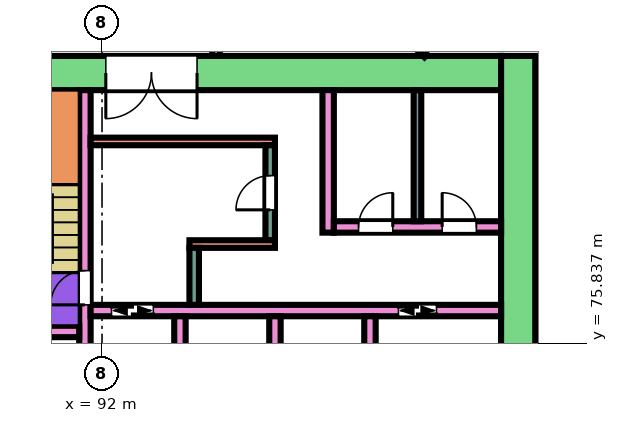
"""IFC4 building model, lengths in metres.
Left out: names, types, materials, properties, quantities, classifications, styles, units other than length and angle.
Written with IfcOpenShell. Run it as: python <this file> out.ifc"""

import sys

from ifc_helpers import new_model, si_unit, direction, frame, frame_2d, origin, place, context, subcontext, project, spatial, rectangle, extrude, element, fill, save


model = new_model("IFC4")
c1 = context("Model", 3, precision=1e-05, world=origin(), true_north=direction((0.0, 1.0)))
c2 = subcontext(c1, "Body", "Model", "MODEL_VIEW")
j1 = project(units=[si_unit("LENGTHUNIT", "METRE"), si_unit("PLANEANGLEUNIT", "RADIAN")], contexts=[c1])
p1 = place(None, origin())
s1 = spatial("IfcSite", under=j1, at=p1, CompositionType="ELEMENT")
p2 = place(p1, origin())
s2 = spatial("IfcBuilding", under=s1, at=p2, CompositionType="ELEMENT")
p3 = place(p2, frame((0.0, 0.0, 12.4)))
s3 = spatial("IfcBuildingStorey", under=s2, at=p3, CompositionType="ELEMENT", Elevation=12.4)
p4 = place(p3, frame((87.9, 82.95, 0.0), z_axis=(0.0, 0.0, 1.0), x_axis=(1.0, 0.0, 0.0)))
e1 = element("IfcWall", 1, at=p4, inside=s3, PredefinedType="SHEAR", context=c2, shape_type="SweptSolid", body=[
    extrude(rectangle(XDim=14.6, YDim=0.9, at=frame_2d((7.3, 0.0))), origin(), (0.0, 0.0, 1.0), 4.95),
])
p5 = place(p4, frame((4.2, 0.0, 0.0)))
e2 = element("IfcOpeningElement", 2, at=p5, cuts=e1, PredefinedType="OPENING", context=c2, shape_type="SweptSolid", body=[
    extrude(rectangle(XDim=2.4, YDim=2.4, at=frame_2d((1.2, 1.2))), frame((0.0, 0.46, 0.0), z_axis=(0.0, -1.0, 0.0), x_axis=(1.0, 0.0, 0.0)), (0.0, 0.0, 1.0), 0.92),
])
p6 = place(p3, frame((102.95, 66.6, 0.0), z_axis=(0.0, 0.0, 1.0), x_axis=(0.0, 1.0, 0.0)))
e3 = element("IfcWall", 3, at=p6, inside=s3, PredefinedType="SHEAR", context=c2, shape_type="SweptSolid", body=[
    extrude(rectangle(XDim=16.8, YDim=0.9, at=frame_2d((8.4, 0.0))), origin(), (0.0, 0.0, 1.0), 4.95),
])
p7 = place(p3, frame((91.55, 75.0, 0.0), z_axis=(0.0, 0.0, 1.0), x_axis=(0.0, 1.0, 0.0)))
e4 = element("IfcWall", 4, at=p7, inside=s3, PredefinedType="SHEAR", context=c2, shape_type="SweptSolid", body=[
    extrude(rectangle(XDim=7.5, YDim=0.3, at=frame_2d((3.75, 0.0))), origin(), (0.0, 0.0, 1.0), 4.95),
])
p8 = place(p7, frame((1.85, 0.0, 0.0)))
e5 = element("IfcOpeningElement", 5, at=p8, cuts=e4, PredefinedType="OPENING", context=c2, shape_type="SweptSolid", body=[
    extrude(rectangle(XDim=0.9, YDim=2.1, at=frame_2d((0.45, 1.05))), frame((0.0, 0.16, 0.0), z_axis=(0.0, -1.0, 0.0), x_axis=(1.0, 0.0, 0.0)), (0.0, 0.0, 1.0), 0.32),
])
p9 = place(p3, frame((88.35, 76.15, 0.0), z_axis=(0.0, 0.0, 1.0), x_axis=(1.0, 0.0, 0.0)))
e6 = element("IfcWall", 6, at=p9, inside=s3, PredefinedType="SHEAR", context=c2, shape_type="SweptSolid", body=[
    extrude(rectangle(XDim=3.05, YDim=0.3, at=frame_2d((1.525, 0.0))), origin(), (0.0, 0.0, 1.0), 4.95),
])
p10 = place(p9, frame((1.1, 0.0, 0.0)))
e7 = element("IfcOpeningElement", 7, at=p10, cuts=e6, PredefinedType="OPENING", context=c2, shape_type="SweptSolid", body=[
    extrude(rectangle(XDim=0.7, YDim=2.0, at=frame_2d((0.35, 1.0))), frame((0.0, 0.16, 0.0), z_axis=(0.0, -1.0, 0.0), x_axis=(1.0, 0.0, 0.0)), (0.0, 0.0, 1.0), 0.32),
])
p11 = place(p3, frame((91.7, 76.7, 0.0), z_axis=(0.0, 0.0, 1.0), x_axis=(1.0, 0.0, 0.0)))
e8 = element("IfcWall", 8, at=p11, inside=s3, PredefinedType="SHEAR", context=c2, shape_type="SweptSolid", body=[
    extrude(rectangle(XDim=10.8, YDim=0.3, at=frame_2d((5.4, 0.0))), origin(), (0.0, 0.0, 1.0), 4.95),
])
p12 = place(p11, frame((0.55, 0.0, 0.0)))
e9 = element("IfcOpeningElement", 9, at=p12, cuts=e8, PredefinedType="OPENING", context=c2, shape_type="SweptSolid", body=[
    extrude(rectangle(XDim=1.1, YDim=2.1, at=frame_2d((0.55, 1.05))), frame((0.0, 0.16, 0.0), z_axis=(0.0, -1.0, 0.0), x_axis=(1.0, 0.0, 0.0)), (0.0, 0.0, 1.0), 0.32),
])
p13 = place(p11, frame((8.1, 0.0, 0.0)))
e10 = element("IfcOpeningElement", 10, at=p13, cuts=e8, PredefinedType="OPENING", context=c2, shape_type="SweptSolid", body=[
    extrude(rectangle(XDim=1.0, YDim=2.1, at=frame_2d((0.5, 1.05))), frame((0.0, 0.16, 0.0), z_axis=(0.0, -1.0, 0.0), x_axis=(1.0, 0.0, 0.0)), (0.0, 0.0, 1.0), 0.32),
])
for number, where, z_axis, x_axis in (
    (11, (94.05, 74.0, 0.0), (0.0, 0.0, 1.0), (0.0, 1.0, 0.0)),
    (12, (96.55, 74.0, 0.0), (0.0, 0.0, 1.0), (0.0, 1.0, 0.0)),
    (13, (99.05, 74.0, 0.0), (0.0, 0.0, 1.0), (0.0, 1.0, 0.0)),
):
    element("IfcWall", number, at=place(p3, frame(where, z_axis=z_axis, x_axis=x_axis)), inside=s3, PredefinedType="SHEAR", context=c2, shape_type="SweptSolid", body=[
        extrude(rectangle(XDim=2.55, YDim=0.3, at=frame_2d((1.275, 0.0))), origin(), (0.0, 0.0, 1.0), 4.95),
    ])
p14 = place(p3, frame((91.7, 81.15, 0.0), z_axis=(0.0, 0.0, 1.0), x_axis=(1.0, 0.0, 0.0)))
e14 = element("IfcWall", 14, at=p14, inside=s3, PredefinedType="SHEAR", context=c2, shape_type="SweptSolid", body=[
    extrude(rectangle(XDim=4.85, YDim=0.2, at=frame_2d((2.425, 0.0))), origin(), (0.0, 0.0, 1.0), 4.95),
])
p15 = place(p3, frame((96.425, 78.55, 0.0), z_axis=(0.0, 0.0, 1.0), x_axis=(0.0, 1.0, 0.0)))
e15 = element("IfcWall", 15, at=p15, inside=s3, PredefinedType="SHEAR", context=c2, shape_type="SweptSolid", body=[
    extrude(rectangle(XDim=2.5, YDim=0.25, at=frame_2d((1.25, 0.0))), origin(), (0.0, 0.0, 1.0), 4.95),
])
p16 = place(p15, frame((0.8, 0.0, 0.0)))
e16 = element("IfcOpeningElement", 16, at=p16, cuts=e15, PredefinedType="OPENING", context=c2, shape_type="SweptSolid", body=[
    extrude(rectangle(XDim=0.9, YDim=2.1, at=frame_2d((0.45, 1.05))), frame((0.0, 0.135, 0.0), z_axis=(0.0, -1.0, 0.0), x_axis=(1.0, 0.0, 0.0)), (0.0, 0.0, 1.0), 0.27),
])
p17 = place(p3, frame((94.3, 78.45, 0.0), z_axis=(0.0, 0.0, 1.0), x_axis=(1.0, 0.0, 0.0)))
e17 = element("IfcWall", 17, at=p17, inside=s3, PredefinedType="SHEAR", context=c2, shape_type="SweptSolid", body=[
    extrude(rectangle(XDim=2.25, YDim=0.2, at=frame_2d((1.125, 0.0))), origin(), (0.0, 0.0, 1.0), 4.95),
])
p18 = place(p3, frame((94.425, 76.85, 0.0), z_axis=(0.0, 0.0, 1.0), x_axis=(0.0, 1.0, 0.0)))
e18 = element("IfcWall", 18, at=p18, inside=s3, PredefinedType="SHEAR", context=c2, shape_type="SweptSolid", body=[
    extrude(rectangle(XDim=1.5, YDim=0.25, at=frame_2d((0.75, 0.0))), origin(), (0.0, 0.0, 1.0), 4.95),
])
p19 = place(p3, frame((97.95, 78.75, 0.0), z_axis=(0.0, 0.0, 1.0), x_axis=(0.0, 1.0, 0.0)))
e19 = element("IfcWall", 19, at=p19, inside=s3, PredefinedType="SHEAR", context=c2, shape_type="SweptSolid", body=[
    extrude(rectangle(XDim=3.75, YDim=0.3, at=frame_2d((1.875, 0.0))), origin(), (0.0, 0.0, 1.0), 4.95),
])
p20 = place(p3, frame((98.1, 78.9, 0.0), z_axis=(0.0, 0.0, 1.0), x_axis=(1.0, 0.0, 0.0)))
e20 = element("IfcWall", 20, at=p20, inside=s3, PredefinedType="SHEAR", context=c2, shape_type="SweptSolid", body=[
    extrude(rectangle(XDim=4.4, YDim=0.3, at=frame_2d((2.2, 0.0))), origin(), (0.0, 0.0, 1.0), 4.95),
])
p21 = place(p20, frame((0.65, 0.0, 0.0)))
e21 = element("IfcOpeningElement", 21, at=p21, cuts=e20, PredefinedType="OPENING", context=c2, shape_type="SweptSolid", body=[
    extrude(rectangle(XDim=0.9, YDim=2.1, at=frame_2d((0.45, 1.05))), frame((0.0, 0.16, 0.0), z_axis=(0.0, -1.0, 0.0), x_axis=(1.0, 0.0, 0.0)), (0.0, 0.0, 1.0), 0.32),
])
p22 = place(p20, frame((2.85, 0.0, 0.0)))
e22 = element("IfcOpeningElement", 22, at=p22, cuts=e20, PredefinedType="OPENING", context=c2, shape_type="SweptSolid", body=[
    extrude(rectangle(XDim=0.9, YDim=2.1, at=frame_2d((0.45, 1.05))), frame((0.0, 0.16, 0.0), z_axis=(0.0, -1.0, 0.0), x_axis=(1.0, 0.0, 0.0)), (0.0, 0.0, 1.0), 0.32),
])
p23 = place(p3, frame((95.0, 83.401, 0.0), z_axis=(0.0, 0.0, 1.0), x_axis=(0.0, 1.0, 0.0)))
e23 = element("IfcWall", 23, at=p23, inside=s3, PredefinedType="PARTITIONING", context=c2, shape_type="SweptSolid", body=[
    extrude(rectangle(XDim=1.499, YDim=0.2, at=frame_2d((0.75, 0.0))), origin(), (0.0, 0.0, 1.0), 4.95),
])
p24 = place(p3, frame((90.536, 93.034, 0.0), z_axis=(0.0, 0.0, 1.0), x_axis=(0.719550314706, -0.694440310327, 0.0)))
e24 = element("IfcWall", 24, at=p24, inside=s3, PredefinedType="PARTITIONING", context=c2, shape_type="SweptSolid", body=[
    extrude(rectangle(XDim=13.875, YDim=0.1, at=frame_2d((6.937, 0.0))), origin(), (0.0, 0.0, 1.0), 4.95),
])
p25 = place(p24, frame((10.763, 0.0, 0.0)))
e25 = element("IfcOpeningElement", 25, at=p25, cuts=e24, PredefinedType="OPENING", context=c2, shape_type="SweptSolid", body=[
    extrude(rectangle(XDim=0.9, YDim=2.1, at=frame_2d((0.45, 1.05))), frame((0.0, 0.06, 0.0), z_axis=(0.0, -1.0, 0.0), x_axis=(1.0, 0.0, 0.0)), (0.0, 0.0, 1.0), 0.12),
])
p26 = place(p24, frame((6.648, 0.0, 0.0)))
e26 = element("IfcOpeningElement", 26, at=p26, cuts=e24, PredefinedType="OPENING", context=c2, shape_type="SweptSolid", body=[
    extrude(rectangle(XDim=0.9, YDim=2.1, at=frame_2d((0.45, 1.05))), frame((0.0, 0.06, 0.0), z_axis=(0.0, -1.0, 0.0), x_axis=(1.0, 0.0, 0.0)), (0.0, 0.0, 1.0), 0.12),
])
p27 = place(p24, frame((2.146, 0.0, 0.0)))
e27 = element("IfcOpeningElement", 27, at=p27, cuts=e24, PredefinedType="OPENING", context=c2, shape_type="SweptSolid", body=[
    extrude(rectangle(XDim=0.9, YDim=2.1, at=frame_2d((0.45, 1.05))), frame((0.0, 0.06, 0.0), z_axis=(0.0, -1.0, 0.0), x_axis=(1.0, 0.0, 0.0)), (0.0, 0.0, 1.0), 0.12),
])
p28 = place(p3, frame((100.3, 79.05, 0.0), z_axis=(0.0, 0.0, 1.0), x_axis=(0.0, 1.0, 0.0)))
e28 = element("IfcWall", 28, at=p28, inside=s3, PredefinedType="PARTITIONING", context=c2, shape_type="SweptSolid", body=[
    extrude(rectangle(XDim=3.45, YDim=0.2, at=frame_2d((1.725, 0.0))), origin(), (0.0, 0.0, 1.0), 4.95),
])
p29 = place(p8, origin())
e29 = element("IfcDoor", 29, at=p29, inside=s3, OperationType="SINGLE_SWING_LEFT", PredefinedType="DOOR", context=c2, shape_type="SweptSolid", body=[
    extrude(rectangle(XDim=0.9, YDim=2.1, at=frame_2d((0.45, 1.05))), frame((0.0, 0.025, 0.0), z_axis=(0.0, -1.0, 0.0), x_axis=(1.0, 0.0, 0.0)), (0.0, 0.0, 1.0), 0.05),
])
fill(e5, e29)
p30 = place(p12, origin())
e30 = element("IfcDoor", 30, at=p30, inside=s3, OperationType="DOUBLE_DOOR_SLIDING", PredefinedType="DOOR", context=c2, shape_type="SweptSolid", body=[
    extrude(rectangle(XDim=1.1, YDim=2.1, at=frame_2d((0.55, 1.05))), frame((0.0, 0.025, 0.0), z_axis=(0.0, -1.0, 0.0), x_axis=(1.0, 0.0, 0.0)), (0.0, 0.0, 1.0), 0.05),
])
fill(e9, e30)
p31 = place(p13, origin())
e31 = element("IfcDoor", 31, at=p31, inside=s3, OperationType="DOUBLE_DOOR_SLIDING", PredefinedType="DOOR", context=c2, shape_type="SweptSolid", body=[
    extrude(rectangle(XDim=1.0, YDim=2.1, at=frame_2d((0.5, 1.05))), frame((0.0, 0.025, 0.0), z_axis=(0.0, -1.0, 0.0), x_axis=(1.0, 0.0, 0.0)), (0.0, 0.0, 1.0), 0.05),
])
fill(e10, e31)
p32 = place(p16, origin())
e32 = element("IfcDoor", 32, at=p32, inside=s3, OperationType="SINGLE_SWING_LEFT", PredefinedType="DOOR", context=c2, shape_type="SweptSolid", body=[
    extrude(rectangle(XDim=0.9, YDim=2.1, at=frame_2d((0.45, 1.05))), frame((0.0, 0.025, 0.0), z_axis=(0.0, -1.0, 0.0), x_axis=(1.0, 0.0, 0.0)), (0.0, 0.0, 1.0), 0.05),
])
fill(e16, e32)
p33 = place(p21, origin())
e33 = element("IfcDoor", 33, at=p33, inside=s3, OperationType="SINGLE_SWING_RIGHT", PredefinedType="DOOR", context=c2, shape_type="SweptSolid", body=[
    extrude(rectangle(XDim=0.9, YDim=2.1, at=frame_2d((0.45, 1.05))), frame((0.0, 0.025, 0.0), z_axis=(0.0, -1.0, 0.0), x_axis=(1.0, 0.0, 0.0)), (0.0, 0.0, 1.0), 0.05),
])
fill(e21, e33)
p34 = place(p22, origin())
e34 = element("IfcDoor", 34, at=p34, inside=s3, OperationType="SINGLE_SWING_LEFT", PredefinedType="DOOR", context=c2, shape_type="SweptSolid", body=[
    extrude(rectangle(XDim=0.9, YDim=2.1, at=frame_2d((0.45, 1.05))), frame((0.0, 0.025, 0.0), z_axis=(0.0, -1.0, 0.0), x_axis=(1.0, 0.0, 0.0)), (0.0, 0.0, 1.0), 0.05),
])
fill(e22, e34)
p35 = place(p5, frame((2.4, 0.0, 0.0), z_axis=(0.0, 0.0, 1.0), x_axis=(-1.0, 0.0, 0.0)))
e35 = element("IfcDoor", 35, at=p35, inside=s3, OperationType="DOUBLE_DOOR_SINGLE_SWING", PredefinedType="DOOR", context=c2, shape_type="SweptSolid", body=[
    extrude(rectangle(XDim=2.4, YDim=2.4, at=frame_2d((1.2, 1.2))), frame((0.0, 0.025, 0.0), z_axis=(0.0, -1.0, 0.0), x_axis=(1.0, 0.0, 0.0)), (0.0, 0.0, 1.0), 0.05),
])
fill(e2, e35)
save(model, sys.argv[1])
